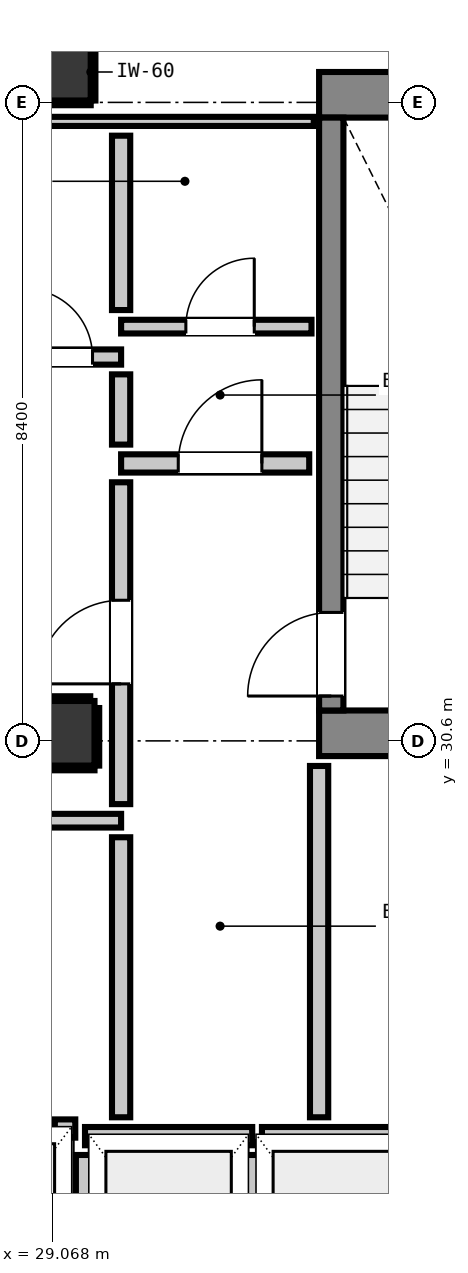
"""IFC4 building model, lengths in metres.
Left out: names, types, materials, properties, quantities, classifications, styles, units other than length and angle.
Written with IfcOpenShell. Run it as: python <this file> out.ifc"""

import sys

from ifc_helpers import new_model, si_unit, direction, frame, frame_2d, origin, origin_2d, place, context, subcontext, project, spatial, rectangle, extrude, element, fill, save


model = new_model("IFC4")
c1 = context("Model", 3, precision=1e-05, world=origin(), true_north=direction((0.0, 1.0)))
c2 = subcontext(c1, "Body", "Model", "MODEL_VIEW")
j1 = project(units=[si_unit("LENGTHUNIT", "METRE"), si_unit("PLANEANGLEUNIT", "RADIAN")], contexts=[c1])
p1 = place(None, origin())
s1 = spatial("IfcSite", under=j1, at=p1, CompositionType="ELEMENT")
p2 = place(p1, origin())
s2 = spatial("IfcBuilding", under=s1, at=p2, CompositionType="ELEMENT")
p3 = place(p2, frame((0.0, 0.0, 190.16)))
s3 = spatial("IfcBuildingStorey", under=s2, at=p3, CompositionType="ELEMENT", Elevation=190.16)
p4 = place(p3, frame((29.2, 39.4, 0.0), z_axis=(0.0, 0.0, 1.0), x_axis=(1.0, 0.0, 0.0)))
e1 = element("IfcColumn", 1, at=p4, inside=s3, PredefinedType="COLUMN", context=c2, shape_type="SweptSolid", body=[
    extrude(rectangle(XDim=0.75, YDim=0.75, at=origin_2d()), origin(), (0.0, 0.0, 1.0), 3.32),
])
p5 = place(p3, frame((32.58, 39.1, 0.0), z_axis=(0.0, 0.0, 1.0), x_axis=(1.0, 0.0, 0.0)))
e2 = element("IfcWall", 2, at=p5, inside=s3, PredefinedType="SHEAR", context=c2, shape_type="SweptSolid", body=[
    extrude(rectangle(XDim=4.08, YDim=0.6, at=frame_2d((2.04, 0.0))), origin(), (0.0, 0.0, 1.0), 3.32),
])
p6 = place(p3, frame((32.58, 30.7, 0.0), z_axis=(0.0, 0.0, 1.0), x_axis=(1.0, 0.0, 0.0)))
e3 = element("IfcWall", 3, at=p6, inside=s3, PredefinedType="SHEAR", context=c2, shape_type="SweptSolid", body=[
    extrude(rectangle(XDim=3.54, YDim=0.6, at=frame_2d((1.77, 0.0))), origin(), (0.0, 0.0, 1.0), 3.32),
])
p7 = place(p3, frame((32.74, 31.0, 0.0), z_axis=(0.0, 0.0, 1.0), x_axis=(0.0, 1.0, 0.0)))
e4 = element("IfcWall", 4, at=p7, inside=s3, PredefinedType="SHEAR", context=c2, shape_type="SweptSolid", body=[
    extrude(rectangle(XDim=7.8, YDim=0.32, at=frame_2d((3.9, 0.0))), origin(), (0.0, 0.0, 1.0), 3.32),
])
p8 = place(p7, frame((0.19, 0.0, 0.0)))
e5 = element("IfcOpeningElement", 5, at=p8, cuts=e4, PredefinedType="OPENING", context=c2, shape_type="SweptSolid", body=[
    extrude(rectangle(XDim=1.1, YDim=2.15, at=frame_2d((0.55, 1.075))), frame((0.0, 0.17, 0.0), z_axis=(0.0, -1.0, 0.0), x_axis=(1.0, 0.0, 0.0)), (0.0, 0.0, 1.0), 0.34),
])
p9 = place(p3, frame((29.2, 30.7, 0.0), z_axis=(0.0, 0.0, 1.0), x_axis=(1.0, 0.0, 0.0)))
e6 = element("IfcColumn", 6, at=p9, inside=s3, PredefinedType="COLUMN", context=c2, shape_type="SweptSolid", body=[
    extrude(rectangle(XDim=0.85, YDim=0.85, at=origin_2d()), origin(), (0.0, 0.0, 1.0), 3.32),
])
p10 = place(p3, frame((29.5, 25.4, 0.0), z_axis=(0.0, 0.0, 1.0), x_axis=(1.0, 0.0, 0.0)))
e7 = element("IfcWall", 7, at=p10, inside=s3, PredefinedType="PARTITIONING", context=c2, shape_type="SweptSolid", body=[
    extrude(rectangle(XDim=2.2, YDim=0.24, at=frame_2d((1.1, 0.0))), origin(), (0.0, 0.0, 1.0), 3.1),
])
p11 = place(p3, frame((29.5, 22.848, 0.0), z_axis=(0.0, 0.0, 1.0), x_axis=(0.0, 1.0, 0.0)))
e8 = element("IfcWall", 8, at=p11, inside=s3, PredefinedType="PARTITIONING", context=c2, shape_type="SweptSolid", body=[
    extrude(rectangle(XDim=2.304, YDim=0.24, at=frame_2d((1.152, 0.0))), origin(), (0.0, 0.0, 1.0), 2.335),
])
p12 = place(p3, frame((31.7, 22.848, 0.0), z_axis=(0.0, 0.0, 1.0), x_axis=(0.0, 1.0, 0.0)))
e9 = element("IfcWall", 9, at=p12, inside=s3, PredefinedType="PARTITIONING", context=c2, shape_type="SweptSolid", body=[
    extrude(rectangle(XDim=2.304, YDim=0.24, at=frame_2d((1.152, 0.0))), origin(), (0.0, 0.0, 1.0), 3.1),
])
p13 = place(p3, frame((31.828, 25.4, 0.0), z_axis=(0.0, 0.0, 1.0), x_axis=(1.0, 0.0, 0.0)))
e10 = element("IfcWall", 10, at=p13, inside=s3, PredefinedType="PARTITIONING", context=c2, shape_type="SweptSolid", body=[
    extrude(rectangle(XDim=2.072, YDim=0.24, at=frame_2d((1.036, 0.0))), origin(), (0.0, 0.0, 1.0), 3.1),
])
p14 = place(p3, frame((29.103, 25.5, 0.0), z_axis=(0.0, 0.0, 1.0), x_axis=(1.0, 0.0, 0.0)))
e11 = element("IfcWall", 11, at=p14, inside=s3, PredefinedType="PARTITIONING", context=c2, shape_type="SweptSolid", body=[
    extrude(rectangle(XDim=0.269, YDim=0.24, at=frame_2d((0.135, 0.0))), origin(), (0.0, 0.0, 1.0), 3.1),
])
p15 = place(p3, frame((29.975, 34.25, 0.0), z_axis=(0.0, 0.0, 1.0), x_axis=(1.0, 0.0, 0.0)))
e12 = element("IfcWall", 12, at=p15, inside=s3, PredefinedType="PARTITIONING", context=c2, shape_type="SweptSolid", body=[
    extrude(rectangle(XDim=2.475, YDim=0.24, at=frame_2d((1.237, 0.0))), origin(), (0.0, 0.0, 1.0), 3.1),
])
p16 = place(p15, frame((0.752, 0.0, 0.0)))
e13 = element("IfcOpeningElement", 13, at=p16, cuts=e12, PredefinedType="OPENING", context=c2, shape_type="SweptSolid", body=[
    extrude(rectangle(XDim=1.1, YDim=2.15, at=frame_2d((0.55, 1.075))), frame((0.0, 0.13, 0.0), z_axis=(0.0, -1.0, 0.0), x_axis=(1.0, 0.0, 0.0)), (0.0, 0.0, 1.0), 0.26),
])
p17 = place(p3, frame((18.95, 35.65, 0.0), z_axis=(0.0, 0.0, 1.0), x_axis=(1.0, 0.0, 0.0)))
e14 = element("IfcWall", 14, at=p17, inside=s3, PredefinedType="PARTITIONING", context=c2, shape_type="SweptSolid", body=[
    extrude(rectangle(XDim=11.025, YDim=0.2, at=frame_2d((5.513, 0.0))), origin(), (0.0, 0.0, 1.0), 3.1),
])
p18 = place(p17, frame((9.749, 0.0, 0.0)))
e15 = element("IfcOpeningElement", 15, at=p18, cuts=e14, PredefinedType="OPENING", context=c2, shape_type="SweptSolid", body=[
    extrude(rectangle(XDim=0.9, YDim=2.1, at=frame_2d((0.45, 1.05))), frame((0.0, 0.11, 0.0), z_axis=(0.0, -1.0, 0.0), x_axis=(1.0, 0.0, 0.0)), (0.0, 0.0, 1.0), 0.22),
])
p19 = place(p3, frame((28.593, 29.55, 0.0), z_axis=(0.0, 0.0, 1.0), x_axis=(1.0, 0.0, 0.0)))
e16 = element("IfcWall", 16, at=p19, inside=s3, PredefinedType="PARTITIONING", context=c2, shape_type="SweptSolid", body=[
    extrude(rectangle(XDim=1.382, YDim=0.18, at=frame_2d((0.691, 0.0))), origin(), (0.0, 0.0, 1.0), 3.1),
])
p20 = place(p3, frame((29.975, 36.05, 0.0), z_axis=(0.0, 0.0, 1.0), x_axis=(1.0, 0.0, 0.0)))
e17 = element("IfcWall", 17, at=p20, inside=s3, PredefinedType="PARTITIONING", context=c2, shape_type="SweptSolid", body=[
    extrude(rectangle(XDim=2.505, YDim=0.18, at=frame_2d((1.252, 0.0))), origin(), (0.0, 0.0, 1.0), 3.1),
])
p21 = place(p20, frame((0.852, 0.0, 0.0)))
e18 = element("IfcOpeningElement", 18, at=p21, cuts=e17, PredefinedType="OPENING", context=c2, shape_type="SweptSolid", body=[
    extrude(rectangle(XDim=0.9, YDim=2.1, at=frame_2d((0.45, 1.05))), frame((0.0, 0.1, 0.0), z_axis=(0.0, -1.0, 0.0), x_axis=(1.0, 0.0, 0.0)), (0.0, 0.0, 1.0), 0.2),
])
p22 = place(p3, frame((18.95, 38.75, 0.0), z_axis=(0.0, 0.0, 1.0), x_axis=(1.0, 0.0, 0.0)))
e19 = element("IfcWall", 19, at=p22, inside=s3, PredefinedType="PARTITIONING", context=c2, shape_type="SweptSolid", body=[
    extrude(rectangle(XDim=13.56, YDim=0.12, at=frame_2d((6.78, 0.0))), origin(), (0.0, 0.0, 1.0), 3.1),
])
p23 = place(p3, frame((29.975, 25.648, 0.0), z_axis=(0.0, 0.0, 1.0), x_axis=(0.0, 1.0, 0.0)))
e20 = element("IfcWall", 20, at=p23, inside=s3, PredefinedType="PARTITIONING", context=c2, shape_type="SweptSolid", body=[
    extrude(rectangle(XDim=3.684, YDim=0.24, at=frame_2d((1.842, 0.0))), origin(), (0.0, 0.0, 1.0), 3.1),
])
p24 = place(p3, frame((29.975, 29.768, 0.0), z_axis=(0.0, 0.0, 1.0), x_axis=(0.0, 1.0, 0.0)))
e21 = element("IfcWall", 21, at=p24, inside=s3, PredefinedType="PARTITIONING", context=c2, shape_type="SweptSolid", body=[
    extrude(rectangle(XDim=4.234, YDim=0.24, at=frame_2d((2.117, 0.0))), origin(), (0.0, 0.0, 1.0), 3.1),
])
p25 = place(p24, frame((1.582, 0.0, 0.0)))
e22 = element("IfcOpeningElement", 22, at=p25, cuts=e21, PredefinedType="OPENING", context=c2, shape_type="SweptSolid", body=[
    extrude(rectangle(XDim=1.1, YDim=2.15, at=frame_2d((0.55, 1.075))), frame((0.0, 0.13, 0.0), z_axis=(0.0, -1.0, 0.0), x_axis=(1.0, 0.0, 0.0)), (0.0, 0.0, 1.0), 0.26),
])
p26 = place(p3, frame((29.975, 34.498, 0.0), z_axis=(0.0, 0.0, 1.0), x_axis=(0.0, 1.0, 0.0)))
e23 = element("IfcWall", 23, at=p26, inside=s3, PredefinedType="PARTITIONING", context=c2, shape_type="SweptSolid", body=[
    extrude(rectangle(XDim=0.924, YDim=0.24, at=frame_2d((0.462, 0.0))), origin(), (0.0, 0.0, 1.0), 3.1),
])
p27 = place(p3, frame((29.975, 36.268, 0.0), z_axis=(0.0, 0.0, 1.0), x_axis=(0.0, 1.0, 0.0)))
e24 = element("IfcWall", 24, at=p27, inside=s3, PredefinedType="PARTITIONING", context=c2, shape_type="SweptSolid", body=[
    extrude(rectangle(XDim=2.294, YDim=0.24, at=frame_2d((1.147, 0.0))), origin(), (0.0, 0.0, 1.0), 3.1),
])
p28 = place(p3, frame((32.58, 25.648, 0.0), z_axis=(0.0, 0.0, 1.0), x_axis=(0.0, 1.0, 0.0)))
e25 = element("IfcWall", 25, at=p28, inside=s3, PredefinedType="PARTITIONING", context=c2, shape_type="SweptSolid", body=[
    extrude(rectangle(XDim=4.622, YDim=0.24, at=frame_2d((2.311, 0.0))), origin(), (0.0, 0.0, 1.0), 3.1),
])
p29 = place(p3, frame((28.833, 38.993, 0.0), z_axis=(0.0, 0.0, 1.0), x_axis=(1.0, 0.0, 0.0)))
e26 = element("IfcWall", 26, at=p29, inside=s3, PredefinedType="PARTITIONING", context=c2, shape_type="SweptSolid", body=[
    extrude(rectangle(XDim=0.742, YDim=0.06, at=frame_2d((0.371, 0.0))), origin(), (0.0, 0.0, 1.0), 1.45),
])
p30 = place(p3, frame((29.607, 39.025, 0.0), z_axis=(0.0, 0.0, 1.0), x_axis=(0.0, 1.0, 0.0)))
e27 = element("IfcWall", 27, at=p30, inside=s3, PredefinedType="PARTITIONING", context=c2, shape_type="SweptSolid", body=[
    extrude(rectangle(XDim=0.75, YDim=0.06, at=frame_2d((0.375, 0.0))), origin(), (0.0, 0.0, 1.0), 1.45),
])
p31 = place(p3, frame((28.775, 30.243, 0.0), z_axis=(0.0, 0.0, 1.0), x_axis=(1.0, 0.0, 0.0)))
e28 = element("IfcWall", 28, at=p31, inside=s3, PredefinedType="PARTITIONING", context=c2, shape_type="SweptSolid", body=[
    extrude(rectangle(XDim=0.85, YDim=0.06, at=frame_2d((0.425, 0.0))), origin(), (0.0, 0.0, 1.0), 1.45),
])
p32 = place(p3, frame((28.775, 31.157, 0.0), z_axis=(0.0, 0.0, 1.0), x_axis=(1.0, 0.0, 0.0)))
e29 = element("IfcWall", 29, at=p32, inside=s3, PredefinedType="PARTITIONING", context=c2, shape_type="SweptSolid", body=[
    extrude(rectangle(XDim=0.794, YDim=0.06, at=frame_2d((0.397, 0.0))), origin(), (0.0, 0.0, 1.0), 1.45),
])
p33 = place(p3, frame((29.657, 30.275, 0.0), z_axis=(0.0, 0.0, 1.0), x_axis=(0.0, 1.0, 0.0)))
e30 = element("IfcWall", 30, at=p33, inside=s3, PredefinedType="PARTITIONING", context=c2, shape_type="SweptSolid", body=[
    extrude(rectangle(XDim=0.757, YDim=0.06, at=frame_2d((0.378, 0.0))), origin(), (0.0, 0.0, 1.0), 1.45),
])
p34 = place(p8, origin())
e31 = element("IfcDoor", 31, at=p34, inside=s3, OperationType="SINGLE_SWING_LEFT", PredefinedType="DOOR", context=c2, shape_type="SweptSolid", body=[
    extrude(rectangle(XDim=1.1, YDim=2.15, at=frame_2d((0.55, 1.075))), frame((0.0, 0.025, 0.0), z_axis=(0.0, -1.0, 0.0), x_axis=(1.0, 0.0, 0.0)), (0.0, 0.0, 1.0), 0.05),
])
fill(e5, e31)
p35 = place(p25, origin())
e32 = element("IfcDoor", 32, at=p35, inside=s3, OperationType="SINGLE_SWING_LEFT", PredefinedType="DOOR", context=c2, shape_type="SweptSolid", body=[
    extrude(rectangle(XDim=1.1, YDim=2.15, at=frame_2d((0.55, 1.075))), frame((0.0, 0.025, 0.0), z_axis=(0.0, -1.0, 0.0), x_axis=(1.0, 0.0, 0.0)), (0.0, 0.0, 1.0), 0.05),
])
fill(e22, e32)
p36 = place(p16, origin())
e33 = element("IfcDoor", 33, at=p36, inside=s3, OperationType="SINGLE_SWING_RIGHT", PredefinedType="DOOR", context=c2, shape_type="SweptSolid", body=[
    extrude(rectangle(XDim=1.1, YDim=2.15, at=frame_2d((0.55, 1.075))), frame((0.0, 0.025, 0.0), z_axis=(0.0, -1.0, 0.0), x_axis=(1.0, 0.0, 0.0)), (0.0, 0.0, 1.0), 0.05),
])
fill(e13, e33)
p37 = place(p21, origin())
e34 = element("IfcDoor", 34, at=p37, inside=s3, OperationType="SINGLE_SWING_RIGHT", PredefinedType="DOOR", context=c2, shape_type="SweptSolid", body=[
    extrude(rectangle(XDim=0.9, YDim=2.1, at=frame_2d((0.45, 1.05))), frame((0.0, 0.025, 0.0), z_axis=(0.0, -1.0, 0.0), x_axis=(1.0, 0.0, 0.0)), (0.0, 0.0, 1.0), 0.05),
])
fill(e18, e34)
p38 = place(p18, origin())
e35 = element("IfcDoor", 35, at=p38, inside=s3, OperationType="SINGLE_SWING_LEFT", PredefinedType="DOOR", context=c2, shape_type="SweptSolid", body=[
    extrude(rectangle(XDim=0.9, YDim=2.1, at=frame_2d((0.45, 1.05))), frame((0.0, 0.025, 0.0), z_axis=(0.0, -1.0, 0.0), x_axis=(1.0, 0.0, 0.0)), (0.0, 0.0, 1.0), 0.05),
])
fill(e15, e35)
save(model, sys.argv[1])
